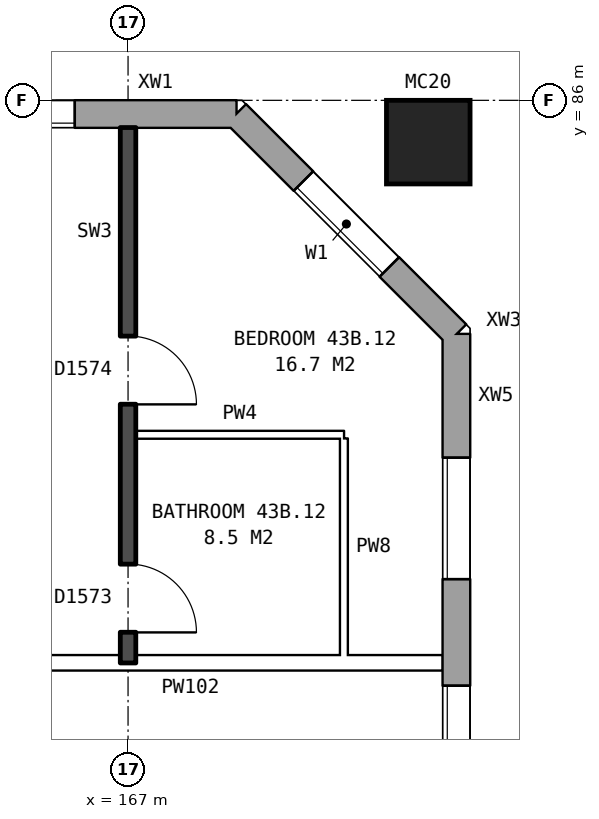
"""IFC4 building model, lengths in metres.
Left out: names, types, materials, properties, quantities, classifications, styles, units other than length and angle.
Written with IfcOpenShell. Run it as: python <this file> out.ifc"""

import sys

from ifc_helpers import new_model, si_unit, direction, frame, frame_2d, origin, origin_2d, place, context, subcontext, project, spatial, rectangle, hollow_rectangle, extrude, element, fill, save


model = new_model("IFC4")
c1 = context("Model", 3, precision=1e-05, world=origin(), true_north=direction((0.0, 1.0)))
c2 = subcontext(c1, "Body", "Model", "MODEL_VIEW")
j1 = project(units=[si_unit("LENGTHUNIT", "METRE"), si_unit("PLANEANGLEUNIT", "RADIAN")], contexts=[c1])
p1 = place(None, origin())
s1 = spatial("IfcSite", under=j1, at=p1, CompositionType="ELEMENT")
p2 = place(p1, origin())
s2 = spatial("IfcBuilding", under=s1, at=p2, CompositionType="ELEMENT")
p3 = place(p2, frame((0.0, 0.0, 154.7)))
s3 = spatial("IfcBuildingStorey", under=s2, at=p3, CompositionType="ELEMENT", Elevation=154.7)
p4 = place(p3, frame((170.95, 85.45, 0.0), z_axis=(0.0, 0.0, 1.0), x_axis=(1.0, 0.0, 0.0)))
e1 = element("IfcColumn", 1, at=p4, inside=s3, PredefinedType="COLUMN", context=c2, shape_type="SweptSolid", body=[
    extrude(hollow_rectangle(XDim=1.1, YDim=1.1, WallThickness=0.06, at=origin_2d()), origin(), (0.0, 0.0, 1.0), 3.1),
])
p5 = place(p3, frame((171.32, 57.075, 0.0), z_axis=(0.0, 0.0, 1.0), x_axis=(0.0, 1.0, 0.0)))
e2 = element("IfcWall", 2, at=p5, inside=s3, PredefinedType="STANDARD", context=c2, shape_type="SweptSolid", body=[
    extrude(rectangle(XDim=25.851, YDim=0.36, at=frame_2d((12.925, 0.0))), origin(), (0.0, 0.0, 1.0), 2.85),
])
p6 = place(p5, frame((1.625, 0.0, 0.8)))
e3 = element("IfcOpeningElement", 3, at=p6, cuts=e2, PredefinedType="OPENING", context=c2, shape_type="SweptSolid", body=[
    extrude(rectangle(XDim=1.6, YDim=1.8, at=frame_2d((0.8, 0.9))), frame((0.0, 0.19, 0.0), z_axis=(0.0, -1.0, 0.0), x_axis=(1.0, 0.0, 0.0)), (0.0, 0.0, 1.0), 0.38),
])
p7 = place(p5, frame((4.625, 0.0, 0.8)))
e4 = element("IfcOpeningElement", 4, at=p7, cuts=e2, PredefinedType="OPENING", context=c2, shape_type="SweptSolid", body=[
    extrude(rectangle(XDim=1.6, YDim=1.8, at=frame_2d((0.8, 0.9))), frame((0.0, 0.19, 0.0), z_axis=(0.0, -1.0, 0.0), x_axis=(1.0, 0.0, 0.0)), (0.0, 0.0, 1.0), 0.38),
])
p8 = place(p5, frame((7.625, 0.0, 0.8)))
e5 = element("IfcOpeningElement", 5, at=p8, cuts=e2, PredefinedType="OPENING", context=c2, shape_type="SweptSolid", body=[
    extrude(rectangle(XDim=1.6, YDim=1.8, at=frame_2d((0.8, 0.9))), frame((0.0, 0.19, 0.0), z_axis=(0.0, -1.0, 0.0), x_axis=(1.0, 0.0, 0.0)), (0.0, 0.0, 1.0), 0.38),
])
p9 = place(p5, frame((6.525, 0.0, 0.8)))
e6 = element("IfcOpeningElement", 6, at=p9, cuts=e2, PredefinedType="OPENING", context=c2, shape_type="SweptSolid", body=[
    extrude(rectangle(XDim=0.8, YDim=1.8, at=frame_2d((0.4, 0.9))), frame((0.0, 0.19, 0.0), z_axis=(0.0, -1.0, 0.0), x_axis=(1.0, 0.0, 0.0)), (0.0, 0.0, 1.0), 0.38),
])
p10 = place(p5, frame((9.525, 0.0, 1.7)))
e7 = element("IfcOpeningElement", 7, at=p10, cuts=e2, PredefinedType="OPENING", context=c2, shape_type="SweptSolid", body=[
    extrude(rectangle(XDim=0.8, YDim=0.9, at=frame_2d((0.4, 0.45))), frame((0.0, 0.19, 0.0), z_axis=(0.0, -1.0, 0.0), x_axis=(1.0, 0.0, 0.0)), (0.0, 0.0, 1.0), 0.38),
])
p11 = place(p5, frame((16.625, 0.0, 0.8)))
e8 = element("IfcOpeningElement", 8, at=p11, cuts=e2, PredefinedType="OPENING", context=c2, shape_type="SweptSolid", body=[
    extrude(rectangle(XDim=1.6, YDim=1.8, at=frame_2d((0.8, 0.9))), frame((0.0, 0.19, 0.0), z_axis=(0.0, -1.0, 0.0), x_axis=(1.0, 0.0, 0.0)), (0.0, 0.0, 1.0), 0.38),
])
p12 = place(p5, frame((19.625, 0.0, 0.8)))
e9 = element("IfcOpeningElement", 9, at=p12, cuts=e2, PredefinedType="OPENING", context=c2, shape_type="SweptSolid", body=[
    extrude(rectangle(XDim=1.6, YDim=1.8, at=frame_2d((0.8, 0.9))), frame((0.0, 0.19, 0.0), z_axis=(0.0, -1.0, 0.0), x_axis=(1.0, 0.0, 0.0)), (0.0, 0.0, 1.0), 0.38),
])
p13 = place(p5, frame((22.625, 0.0, 0.8)))
e10 = element("IfcOpeningElement", 10, at=p13, cuts=e2, PredefinedType="OPENING", context=c2, shape_type="SweptSolid", body=[
    extrude(rectangle(XDim=1.6, YDim=1.8, at=frame_2d((0.8, 0.9))), frame((0.0, 0.19, 0.0), z_axis=(0.0, -1.0, 0.0), x_axis=(1.0, 0.0, 0.0)), (0.0, 0.0, 1.0), 0.38),
])
p14 = place(p5, frame((11.425, 0.0, 0.8)))
e11 = element("IfcOpeningElement", 11, at=p14, cuts=e2, PredefinedType="OPENING", context=c2, shape_type="SweptSolid", body=[
    extrude(rectangle(XDim=0.6, YDim=0.9, at=frame_2d((0.3, 0.45))), frame((0.0, 0.19, 0.0), z_axis=(0.0, -1.0, 0.0), x_axis=(1.0, 0.0, 0.0)), (0.0, 0.0, 1.0), 0.38),
])
p15 = place(p5, frame((12.325, 0.0, 0.8)))
e12 = element("IfcOpeningElement", 12, at=p15, cuts=e2, PredefinedType="OPENING", context=c2, shape_type="SweptSolid", body=[
    extrude(rectangle(XDim=1.2, YDim=1.8, at=frame_2d((0.6, 0.9))), frame((0.0, 0.19, 0.0), z_axis=(0.0, -1.0, 0.0), x_axis=(1.0, 0.0, 0.0)), (0.0, 0.0, 1.0), 0.38),
])
p16 = place(p5, frame((13.825, 0.0, 0.8)))
e13 = element("IfcOpeningElement", 13, at=p16, cuts=e2, PredefinedType="OPENING", context=c2, shape_type="SweptSolid", body=[
    extrude(rectangle(XDim=0.6, YDim=0.9, at=frame_2d((0.3, 0.45))), frame((0.0, 0.19, 0.0), z_axis=(0.0, -1.0, 0.0), x_axis=(1.0, 0.0, 0.0)), (0.0, 0.0, 1.0), 0.38),
])
p17 = place(p5, frame((15.475, 0.0, 1.7)))
e14 = element("IfcOpeningElement", 14, at=p17, cuts=e2, PredefinedType="OPENING", context=c2, shape_type="SweptSolid", body=[
    extrude(rectangle(XDim=0.6, YDim=0.9, at=frame_2d((0.3, 0.45))), frame((0.0, 0.19, 0.0), z_axis=(0.0, -1.0, 0.0), x_axis=(1.0, 0.0, 0.0)), (0.0, 0.0, 1.0), 0.38),
])
p18 = place(p5, frame((18.525, 0.0, 0.8)))
e15 = element("IfcOpeningElement", 15, at=p18, cuts=e2, PredefinedType="OPENING", context=c2, shape_type="SweptSolid", body=[
    extrude(rectangle(XDim=0.8, YDim=1.8, at=frame_2d((0.4, 0.9))), frame((0.0, 0.19, 0.0), z_axis=(0.0, -1.0, 0.0), x_axis=(1.0, 0.0, 0.0)), (0.0, 0.0, 1.0), 0.38),
])
p19 = place(p3, frame((171.32, 82.925, 0.0), z_axis=(0.0, 0.0, 1.0), x_axis=(-0.707106781187, 0.707106781187, 0.0)))
e16 = element("IfcWall", 16, at=p19, inside=s3, PredefinedType="STANDARD", context=c2, shape_type="SweptSolid", body=[
    extrude(rectangle(XDim=4.094, YDim=0.36, at=frame_2d((2.047, 0.0))), origin(), (0.0, 0.0, 1.0), 2.85),
])
p20 = place(p19, frame((1.247, 0.0, 0.8)))
e17 = element("IfcOpeningElement", 17, at=p20, cuts=e16, PredefinedType="OPENING", context=c2, shape_type="SweptSolid", body=[
    extrude(rectangle(XDim=1.6, YDim=1.8, at=frame_2d((0.8, 0.9))), frame((0.0, 0.19, 0.0), z_axis=(0.0, -1.0, 0.0), x_axis=(1.0, 0.0, 0.0)), (0.0, 0.0, 1.0), 0.38),
])
p21 = place(p3, frame((168.425, 85.82, 0.0), z_axis=(0.0, 0.0, 1.0), x_axis=(-1.0, 0.0, 0.0)))
e18 = element("IfcWall", 18, at=p21, inside=s3, PredefinedType="STANDARD", context=c2, shape_type="SweptSolid", body=[
    extrude(rectangle(XDim=34.351, YDim=0.36, at=frame_2d((17.175, 0.0))), origin(), (0.0, 0.0, 1.0), 2.85),
])
p22 = place(p21, frame((2.125, 0.0, 0.8)))
e19 = element("IfcOpeningElement", 19, at=p22, cuts=e18, PredefinedType="OPENING", context=c2, shape_type="SweptSolid", body=[
    extrude(rectangle(XDim=1.6, YDim=1.8, at=frame_2d((0.8, 0.9))), frame((0.0, 0.19, 0.0), z_axis=(0.0, -1.0, 0.0), x_axis=(1.0, 0.0, 0.0)), (0.0, 0.0, 1.0), 0.38),
])
p23 = place(p21, frame((4.025, 0.0, 1.7)))
e20 = element("IfcOpeningElement", 20, at=p23, cuts=e18, PredefinedType="OPENING", context=c2, shape_type="SweptSolid", body=[
    extrude(rectangle(XDim=1.4, YDim=0.9, at=frame_2d((0.7, 0.45))), frame((0.0, 0.19, 0.0), z_axis=(0.0, -1.0, 0.0), x_axis=(1.0, 0.0, 0.0)), (0.0, 0.0, 1.0), 0.38),
])
p24 = place(p21, frame((8.125, 0.0, 0.8)))
e21 = element("IfcOpeningElement", 21, at=p24, cuts=e18, PredefinedType="OPENING", context=c2, shape_type="SweptSolid", body=[
    extrude(rectangle(XDim=1.6, YDim=1.8, at=frame_2d((0.8, 0.9))), frame((0.0, 0.19, 0.0), z_axis=(0.0, -1.0, 0.0), x_axis=(1.0, 0.0, 0.0)), (0.0, 0.0, 1.0), 0.38),
])
p25 = place(p21, frame((11.125, 0.0, 0.8)))
e22 = element("IfcOpeningElement", 22, at=p25, cuts=e18, PredefinedType="OPENING", context=c2, shape_type="SweptSolid", body=[
    extrude(rectangle(XDim=1.6, YDim=1.8, at=frame_2d((0.8, 0.9))), frame((0.0, 0.19, 0.0), z_axis=(0.0, -1.0, 0.0), x_axis=(1.0, 0.0, 0.0)), (0.0, 0.0, 1.0), 0.38),
])
p26 = place(p21, frame((14.125, 0.0, 0.8)))
e23 = element("IfcOpeningElement", 23, at=p26, cuts=e18, PredefinedType="OPENING", context=c2, shape_type="SweptSolid", body=[
    extrude(rectangle(XDim=1.6, YDim=1.8, at=frame_2d((0.8, 0.9))), frame((0.0, 0.19, 0.0), z_axis=(0.0, -1.0, 0.0), x_axis=(1.0, 0.0, 0.0)), (0.0, 0.0, 1.0), 0.38),
])
p27 = place(p21, frame((17.125, 0.0, 0.8)))
e24 = element("IfcOpeningElement", 24, at=p27, cuts=e18, PredefinedType="OPENING", context=c2, shape_type="SweptSolid", body=[
    extrude(rectangle(XDim=1.6, YDim=1.8, at=frame_2d((0.8, 0.9))), frame((0.0, 0.19, 0.0), z_axis=(0.0, -1.0, 0.0), x_axis=(1.0, 0.0, 0.0)), (0.0, 0.0, 1.0), 0.38),
])
p28 = place(p21, frame((20.125, 0.0, 0.8)))
e25 = element("IfcOpeningElement", 25, at=p28, cuts=e18, PredefinedType="OPENING", context=c2, shape_type="SweptSolid", body=[
    extrude(rectangle(XDim=1.6, YDim=1.8, at=frame_2d((0.8, 0.9))), frame((0.0, 0.19, 0.0), z_axis=(0.0, -1.0, 0.0), x_axis=(1.0, 0.0, 0.0)), (0.0, 0.0, 1.0), 0.38),
])
p29 = place(p21, frame((23.125, 0.0, 0.8)))
e26 = element("IfcOpeningElement", 26, at=p29, cuts=e18, PredefinedType="OPENING", context=c2, shape_type="SweptSolid", body=[
    extrude(rectangle(XDim=1.6, YDim=1.8, at=frame_2d((0.8, 0.9))), frame((0.0, 0.19, 0.0), z_axis=(0.0, -1.0, 0.0), x_axis=(1.0, 0.0, 0.0)), (0.0, 0.0, 1.0), 0.38),
])
p30 = place(p21, frame((25.625, 0.0, 0.8)))
e27 = element("IfcOpeningElement", 27, at=p30, cuts=e18, PredefinedType="OPENING", context=c2, shape_type="SweptSolid", body=[
    extrude(rectangle(XDim=1.0, YDim=1.8, at=frame_2d((0.5, 0.9))), frame((0.0, 0.19, 0.0), z_axis=(0.0, -1.0, 0.0), x_axis=(1.0, 0.0, 0.0)), (0.0, 0.0, 1.0), 0.38),
])
p31 = place(p21, frame((26.925, 0.0, 0.8)))
e28 = element("IfcOpeningElement", 28, at=p31, cuts=e18, PredefinedType="OPENING", context=c2, shape_type="SweptSolid", body=[
    extrude(rectangle(XDim=0.8, YDim=0.9, at=frame_2d((0.4, 0.45))), frame((0.0, 0.19, 0.0), z_axis=(0.0, -1.0, 0.0), x_axis=(1.0, 0.0, 0.0)), (0.0, 0.0, 1.0), 0.38),
])
p32 = place(p21, frame((32.125, 0.0, 0.8)))
e29 = element("IfcOpeningElement", 29, at=p32, cuts=e18, PredefinedType="OPENING", context=c2, shape_type="SweptSolid", body=[
    extrude(rectangle(XDim=1.6, YDim=1.8, at=frame_2d((0.8, 0.9))), frame((0.0, 0.19, 0.0), z_axis=(0.0, -1.0, 0.0), x_axis=(1.0, 0.0, 0.0)), (0.0, 0.0, 1.0), 0.38),
])
p33 = place(p21, frame((6.625, 0.0, 0.8)))
e30 = element("IfcOpeningElement", 30, at=p33, cuts=e18, PredefinedType="OPENING", context=c2, shape_type="SweptSolid", body=[
    extrude(rectangle(XDim=0.6, YDim=0.9, at=frame_2d((0.3, 0.45))), frame((0.0, 0.19, 0.0), z_axis=(0.0, -1.0, 0.0), x_axis=(1.0, 0.0, 0.0)), (0.0, 0.0, 1.0), 0.38),
])
p34 = place(p21, frame((28.925, 0.0, 1.7)))
e31 = element("IfcOpeningElement", 31, at=p34, cuts=e18, PredefinedType="OPENING", context=c2, shape_type="SweptSolid", body=[
    extrude(rectangle(XDim=0.8, YDim=0.9, at=frame_2d((0.4, 0.45))), frame((0.0, 0.19, 0.0), z_axis=(0.0, -1.0, 0.0), x_axis=(1.0, 0.0, 0.0)), (0.0, 0.0, 1.0), 0.38),
])
p35 = place(p21, frame((30.025, 0.0, 0.8)))
e32 = element("IfcOpeningElement", 32, at=p35, cuts=e18, PredefinedType="OPENING", context=c2, shape_type="SweptSolid", body=[
    extrude(rectangle(XDim=1.2, YDim=1.8, at=frame_2d((0.6, 0.9))), frame((0.0, 0.19, 0.0), z_axis=(0.0, -1.0, 0.0), x_axis=(1.0, 0.0, 0.0)), (0.0, 0.0, 1.0), 0.38),
])
p36 = place(p3, frame((155.1, 78.6, 0.0), z_axis=(0.0, 0.0, 1.0), x_axis=(1.0, 0.0, 0.0)))
e33 = element("IfcWall", 33, at=p36, inside=s3, PredefinedType="PARTITIONING", context=c2, shape_type="SweptSolid", body=[
    extrude(rectangle(XDim=16.04, YDim=0.2, at=frame_2d((8.02, 0.0))), origin(), (0.0, 0.0, 1.0), 2.85),
])
p37 = place(p36, frame((1.45, 0.0, 0.0)))
e34 = element("IfcOpeningElement", 34, at=p37, cuts=e33, PredefinedType="OPENING", context=c2, shape_type="SweptSolid", body=[
    extrude(rectangle(XDim=1.0, YDim=2.1, at=frame_2d((0.5, 1.05))), frame((0.0, 0.11, 0.0), z_axis=(0.0, -1.0, 0.0), x_axis=(1.0, 0.0, 0.0)), (0.0, 0.0, 1.0), 0.22),
])
p38 = place(p36, frame((8.4, 0.0, 0.0)))
e35 = element("IfcOpeningElement", 35, at=p38, cuts=e33, PredefinedType="OPENING", context=c2, shape_type="SweptSolid", body=[
    extrude(rectangle(XDim=1.0, YDim=2.1, at=frame_2d((0.5, 1.05))), frame((0.0, 0.11, 0.0), z_axis=(0.0, -1.0, 0.0), x_axis=(1.0, 0.0, 0.0)), (0.0, 0.0, 1.0), 0.22),
])
p39 = place(p3, frame((167.1, 81.6, 0.0), z_axis=(0.0, 0.0, 1.0), x_axis=(1.0, 0.0, 0.0)))
e36 = element("IfcWall", 36, at=p39, inside=s3, PredefinedType="PARTITIONING", context=c2, shape_type="SweptSolid", body=[
    extrude(rectangle(XDim=2.74, YDim=0.1, at=frame_2d((1.37, 0.0))), origin(), (0.0, 0.0, 1.0), 2.85),
])
p40 = place(p3, frame((167.0, 78.6, 0.0), z_axis=(0.0, 0.0, 1.0), x_axis=(0.0, 1.0, 0.0)))
e37 = element("IfcWall", 37, at=p40, inside=s3, PredefinedType="SOLIDWALL", context=c2, shape_type="SweptSolid", body=[
    extrude(rectangle(XDim=7.04, YDim=0.2, at=frame_2d((3.52, 0.0))), origin(), (0.0, 0.0, 1.0), 2.85),
])
p41 = place(p40, frame((3.4, 0.0, 0.0)))
e38 = element("IfcOpeningElement", 38, at=p41, cuts=e37, PredefinedType="OPENING", context=c2, shape_type="SweptSolid", body=[
    extrude(rectangle(XDim=0.9, YDim=2.1, at=frame_2d((0.45, 1.05))), frame((0.0, 0.11, 0.0), z_axis=(0.0, -1.0, 0.0), x_axis=(1.0, 0.0, 0.0)), (0.0, 0.0, 1.0), 0.22),
])
p42 = place(p40, frame((0.4, 0.0, 0.0)))
e39 = element("IfcOpeningElement", 39, at=p42, cuts=e37, PredefinedType="OPENING", context=c2, shape_type="SweptSolid", body=[
    extrude(rectangle(XDim=0.9, YDim=2.1, at=frame_2d((0.45, 1.05))), frame((0.0, 0.11, 0.0), z_axis=(0.0, -1.0, 0.0), x_axis=(1.0, 0.0, 0.0)), (0.0, 0.0, 1.0), 0.22),
])
p43 = place(p3, frame((169.84, 78.7, 0.0), z_axis=(0.0, 0.0, 1.0), x_axis=(0.0, 1.0, 0.0)))
e40 = element("IfcWall", 40, at=p43, inside=s3, PredefinedType="PARTITIONING", context=c2, shape_type="SweptSolid", body=[
    extrude(rectangle(XDim=2.85, YDim=0.1, at=frame_2d((1.425, 0.0))), origin(), (0.0, 0.0, 1.0), 2.85),
])
p44 = place(p12, origin())
e41 = element("IfcWindow", 41, at=p44, inside=s3, PartitioningType="SINGLE_PANEL", PredefinedType="WINDOW", context=c2, shape_type="SweptSolid", body=[
    extrude(rectangle(XDim=1.6, YDim=1.8, at=frame_2d((0.8, 0.9))), frame((0.0, 0.15, 0.0), z_axis=(0.0, -1.0, 0.0), x_axis=(1.0, 0.0, 0.0)), (0.0, 0.0, 1.0), 0.06),
])
fill(e9, e41)
p45 = place(p13, origin())
e42 = element("IfcWindow", 42, at=p45, inside=s3, PartitioningType="SINGLE_PANEL", PredefinedType="WINDOW", context=c2, shape_type="SweptSolid", body=[
    extrude(rectangle(XDim=1.6, YDim=1.8, at=frame_2d((0.8, 0.9))), frame((0.0, 0.15, 0.0), z_axis=(0.0, -1.0, 0.0), x_axis=(1.0, 0.0, 0.0)), (0.0, 0.0, 1.0), 0.06),
])
fill(e10, e42)
p46 = place(p20, origin())
e43 = element("IfcWindow", 43, at=p46, inside=s3, PartitioningType="SINGLE_PANEL", PredefinedType="WINDOW", context=c2, shape_type="SweptSolid", body=[
    extrude(rectangle(XDim=1.6, YDim=1.8, at=frame_2d((0.8, 0.9))), frame((0.0, 0.15, 0.0), z_axis=(0.0, -1.0, 0.0), x_axis=(1.0, 0.0, 0.0)), (0.0, 0.0, 1.0), 0.06),
])
fill(e17, e43)
p47 = place(p22, origin())
e44 = element("IfcWindow", 44, at=p47, inside=s3, PartitioningType="SINGLE_PANEL", PredefinedType="WINDOW", context=c2, shape_type="SweptSolid", body=[
    extrude(rectangle(XDim=1.6, YDim=1.8, at=frame_2d((0.8, 0.9))), frame((0.0, 0.15, 0.0), z_axis=(0.0, -1.0, 0.0), x_axis=(1.0, 0.0, 0.0)), (0.0, 0.0, 1.0), 0.06),
])
fill(e19, e44)
p48 = place(p41, frame((0.9, 0.0, 0.0), z_axis=(0.0, 0.0, 1.0), x_axis=(-1.0, 0.0, 0.0)))
e45 = element("IfcDoor", 45, at=p48, inside=s3, OperationType="SINGLE_SWING_RIGHT", PredefinedType="DOOR", context=c2, shape_type="SweptSolid", body=[
    extrude(rectangle(XDim=0.9, YDim=2.1, at=frame_2d((0.45, 1.05))), frame((0.0, 0.025, 0.0), z_axis=(0.0, -1.0, 0.0), x_axis=(1.0, 0.0, 0.0)), (0.0, 0.0, 1.0), 0.05),
])
fill(e38, e45)
p49 = place(p42, frame((0.9, 0.0, 0.0), z_axis=(0.0, 0.0, 1.0), x_axis=(-1.0, 0.0, 0.0)))
e46 = element("IfcDoor", 46, at=p49, inside=s3, OperationType="SINGLE_SWING_RIGHT", PredefinedType="DOOR", context=c2, shape_type="SweptSolid", body=[
    extrude(rectangle(XDim=0.9, YDim=2.1, at=frame_2d((0.45, 1.05))), frame((0.0, 0.025, 0.0), z_axis=(0.0, -1.0, 0.0), x_axis=(1.0, 0.0, 0.0)), (0.0, 0.0, 1.0), 0.05),
])
fill(e39, e46)
save(model, sys.argv[1])
